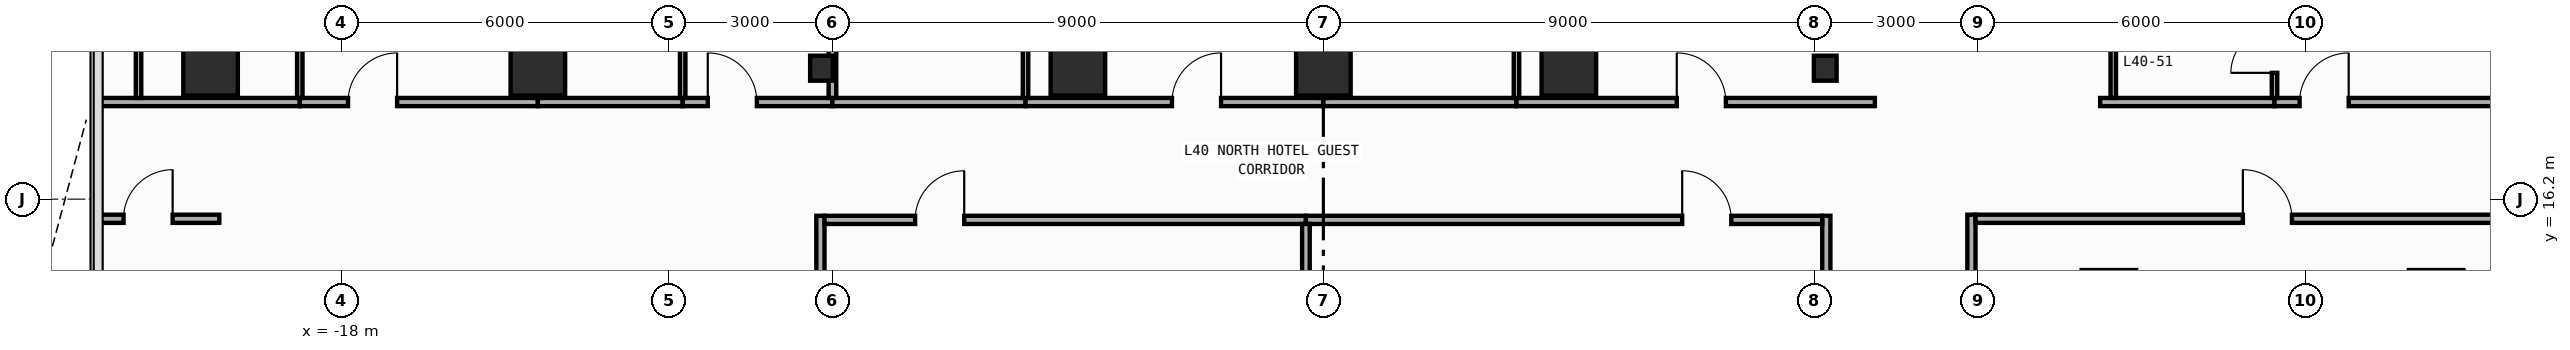
"""IFC4 building model, lengths in metres.
Left out: names, types, materials, properties, quantities, classifications, styles, units other than length and angle.
Written with IfcOpenShell. Run it as: python <this file> out.ifc"""

import sys

from ifc_helpers import new_model, si_unit, direction, frame, frame_2d, origin, origin_2d, place, context, subcontext, project, spatial, rectangle, i_section, extrude, element, fill, save


model = new_model("IFC4")
c1 = context("Model", 3, precision=1e-05, world=origin(), true_north=direction((0.0, 1.0)))
c2 = subcontext(c1, "Body", "Model", "MODEL_VIEW")
j1 = project(units=[si_unit("LENGTHUNIT", "METRE"), si_unit("PLANEANGLEUNIT", "RADIAN")], contexts=[c1])
p1 = place(None, origin())
s1 = spatial("IfcSite", under=j1, at=p1, CompositionType="ELEMENT")
p2 = place(p1, origin())
s2 = spatial("IfcBuilding", under=s1, at=p2, CompositionType="ELEMENT")
p3 = place(p2, frame((0.0, 0.0, 176.4)))
s3 = spatial("IfcBuildingStorey", under=s2, at=p3, CompositionType="ELEMENT", Elevation=176.4)
for number, where, z_axis, x_axis in (
    (1, (-9.2, 18.6, 0.0), (0.0, 0.0, 1.0), (1.0, 0.0, 0.0)),
    (2, (9.2, 18.6, 0.0), (0.0, 0.0, 1.0), (1.0, 0.0, 0.0)),
):
    element("IfcColumn", number, at=place(p3, frame(where, z_axis=z_axis, x_axis=x_axis)), inside=s3, PredefinedType="COLUMN", context=c2, shape_type="SweptSolid", body=[
        extrude(i_section(OverallWidth=0.417, OverallDepth=0.458, WebThickness=0.03, FlangeThickness=0.05, FilletRadius=0.022, at=origin_2d()), origin(), (0.0, 0.0, 1.0), 3.8),
    ])
for number, where, z_axis, x_axis in (
    (3, (-20.4, 18.6, 0.0), (0.0, 0.0, 1.0), (1.0, 0.0, 0.0)),
    (4, (-14.4, 18.6, 0.0), (0.0, 0.0, 1.0), (1.0, 0.0, 0.0)),
    (5, (-4.5, 18.6, 0.0), (0.0, 0.0, 1.0), (1.0, 0.0, 0.0)),
    (6, (0.0, 18.6, 0.0), (0.0, 0.0, 1.0), (1.0, 0.0, 0.0)),
    (7, (4.5, 18.6, 0.0), (0.0, 0.0, 1.0), (1.0, 0.0, 0.0)),
):
    element("IfcColumn", number, at=place(p3, frame(where, z_axis=z_axis, x_axis=x_axis)), inside=s3, PredefinedType="COLUMN", context=c2, shape_type="SweptSolid", body=[
        extrude(rectangle(XDim=1.0, YDim=1.0, at=origin_2d()), origin(), (0.0, 0.0, 1.0), 3.8),
    ])
p4 = place(p3, frame((-9.22, 0.5, 0.0), z_axis=(0.0, 0.0, 1.0), x_axis=(0.0, 1.0, 0.0)))
e8 = element("IfcWall", 8, at=p4, inside=s3, PredefinedType="PARTITIONING", context=c2, shape_type="SweptSolid", body=[
    extrude(rectangle(XDim=15.395, YDim=0.15, at=frame_2d((7.698, 0.0))), origin(), (0.0, 0.0, 1.0), 2.952),
])
p5 = place(p4, frame((4.512, 0.0, 0.0)))
e9 = element("IfcOpeningElement", 9, at=p5, cuts=e8, PredefinedType="OPENING", context=c2, shape_type="SweptSolid", body=[
    extrude(rectangle(XDim=0.9, YDim=2.15, at=frame_2d((0.45, 1.075))), frame((0.0, 0.085, 0.0), z_axis=(0.0, -1.0, 0.0), x_axis=(1.0, 0.0, 0.0)), (0.0, 0.0, 1.0), 0.17),
])
p6 = place(p3, frame((9.22, 0.5, 0.0), z_axis=(0.0, 0.0, 1.0), x_axis=(0.0, 1.0, 0.0)))
e10 = element("IfcWall", 10, at=p6, inside=s3, PredefinedType="PARTITIONING", context=c2, shape_type="SweptSolid", body=[
    extrude(rectangle(XDim=15.395, YDim=0.15, at=frame_2d((7.698, 0.0))), origin(), (0.0, 0.0, 1.0), 2.952),
])
p7 = place(p6, frame((4.512, 0.0, 0.0)))
e11 = element("IfcOpeningElement", 11, at=p7, cuts=e10, PredefinedType="OPENING", context=c2, shape_type="SweptSolid", body=[
    extrude(rectangle(XDim=0.9, YDim=2.15, at=frame_2d((0.45, 1.075))), frame((0.0, 0.085, 0.0), z_axis=(0.0, -1.0, 0.0), x_axis=(1.0, 0.0, 0.0)), (0.0, 0.0, 1.0), 0.17),
])
p8 = place(p3, frame((11.88, 7.16, 0.0), z_axis=(0.0, 0.0, 1.0), x_axis=(0.0, 1.0, 0.0)))
e12 = element("IfcWall", 12, at=p8, inside=s3, PredefinedType="PARTITIONING", context=c2, shape_type="SweptSolid", body=[
    extrude(rectangle(XDim=8.755, YDim=0.15, at=frame_2d((4.377, 0.0))), origin(), (0.0, 0.0, 1.0), 3.54),
])
p9 = place(p8, frame((0.46, 0.0, 0.0)))
e13 = element("IfcOpeningElement", 13, at=p9, cuts=e12, PredefinedType="OPENING", context=c2, shape_type="SweptSolid", body=[
    extrude(rectangle(XDim=0.9, YDim=2.15, at=frame_2d((0.45, 1.075))), frame((0.0, 0.085, 0.0), z_axis=(0.0, -1.0, 0.0), x_axis=(1.0, 0.0, 0.0)), (0.0, 0.0, 1.0), 0.17),
])
p10 = place(p3, frame((-9.145, 15.82, 0.0), z_axis=(0.0, 0.0, 1.0), x_axis=(1.0, 0.0, 0.0)))
e14 = element("IfcWall", 14, at=p10, inside=s3, PredefinedType="PARTITIONING", context=c2, shape_type="SweptSolid", body=[
    extrude(rectangle(XDim=8.825, YDim=0.15, at=frame_2d((4.413, 0.0))), origin(), (0.0, 0.0, 1.0), 3.54),
])
p11 = place(p10, frame((1.661, 0.0, 0.0)))
e15 = element("IfcOpeningElement", 15, at=p11, cuts=e14, PredefinedType="OPENING", context=c2, shape_type="SweptSolid", body=[
    extrude(rectangle(XDim=0.9, YDim=2.15, at=frame_2d((0.45, 1.075))), frame((0.0, 0.085, 0.0), z_axis=(0.0, -1.0, 0.0), x_axis=(1.0, 0.0, 0.0)), (0.0, 0.0, 1.0), 0.17),
])
p12 = place(p3, frame((-0.32, 15.82, 0.0), z_axis=(0.0, 0.0, 1.0), x_axis=(1.0, 0.0, 0.0)))
e16 = element("IfcWall", 16, at=p12, inside=s3, PredefinedType="PARTITIONING", context=c2, shape_type="SweptSolid", body=[
    extrude(rectangle(XDim=9.465, YDim=0.15, at=frame_2d((4.732, 0.0))), origin(), (0.0, 0.0, 1.0), 3.54),
])
p13 = place(p12, frame((6.898, 0.0, 0.0)))
e17 = element("IfcOpeningElement", 17, at=p13, cuts=e16, PredefinedType="OPENING", context=c2, shape_type="SweptSolid", body=[
    extrude(rectangle(XDim=0.9, YDim=2.15, at=frame_2d((0.45, 1.075))), frame((0.0, 0.085, 0.0), z_axis=(0.0, -1.0, 0.0), x_axis=(1.0, 0.0, 0.0)), (0.0, 0.0, 1.0), 0.17),
])
p14 = place(p3, frame((-22.455, 17.98, 0.0), z_axis=(0.0, 0.0, 1.0), x_axis=(1.0, 0.0, 0.0)))
e18 = element("IfcWall", 18, at=p14, inside=s3, PredefinedType="PARTITIONING", context=c2, shape_type="SweptSolid", body=[
    extrude(rectangle(XDim=3.691, YDim=0.15, at=frame_2d((1.846, 0.0))), origin(), (0.0, 0.0, 1.0), 3.54),
])
p15 = place(p3, frame((-18.764, 17.98, 0.0), z_axis=(0.0, 0.0, 1.0), x_axis=(1.0, 0.0, 0.0)))
e19 = element("IfcWall", 19, at=p15, inside=s3, PredefinedType="PARTITIONING", context=c2, shape_type="SweptSolid", body=[
    extrude(rectangle(XDim=4.364, YDim=0.15, at=frame_2d((2.182, 0.0))), origin(), (0.0, 0.0, 1.0), 3.54),
])
p16 = place(p15, frame((0.884, 0.0, 0.0)))
e20 = element("IfcOpeningElement", 20, at=p16, cuts=e19, PredefinedType="OPENING", context=c2, shape_type="SweptSolid", body=[
    extrude(rectangle(XDim=0.9, YDim=2.15, at=frame_2d((0.45, 1.075))), frame((0.0, 0.085, 0.0), z_axis=(0.0, -1.0, 0.0), x_axis=(1.0, 0.0, 0.0)), (0.0, 0.0, 1.0), 0.17),
])
p17 = place(p3, frame((-14.4, 17.98, 0.0), z_axis=(0.0, 0.0, 1.0), x_axis=(1.0, 0.0, 0.0)))
e21 = element("IfcWall", 21, at=p17, inside=s3, PredefinedType="PARTITIONING", context=c2, shape_type="SweptSolid", body=[
    extrude(rectangle(XDim=2.655, YDim=0.15, at=frame_2d((1.327, 0.0))), origin(), (0.0, 0.0, 1.0), 3.54),
])
p18 = place(p3, frame((-11.745, 17.98, 0.0), z_axis=(0.0, 0.0, 1.0), x_axis=(1.0, 0.0, 0.0)))
e22 = element("IfcWall", 22, at=p18, inside=s3, PredefinedType="PARTITIONING", context=c2, shape_type="SweptSolid", body=[
    extrude(rectangle(XDim=2.745, YDim=0.15, at=frame_2d((1.373, 0.0))), origin(), (0.0, 0.0, 1.0), 3.54),
])
p19 = place(p18, frame((0.46, 0.0, 0.0)))
e23 = element("IfcOpeningElement", 23, at=p19, cuts=e22, PredefinedType="OPENING", context=c2, shape_type="SweptSolid", body=[
    extrude(rectangle(XDim=0.9, YDim=2.15, at=frame_2d((0.45, 1.075))), frame((0.0, 0.085, 0.0), z_axis=(0.0, -1.0, 0.0), x_axis=(1.0, 0.0, 0.0)), (0.0, 0.0, 1.0), 0.17),
])
p20 = place(p3, frame((-9.0, 17.98, 0.0), z_axis=(0.0, 0.0, 1.0), x_axis=(1.0, 0.0, 0.0)))
e24 = element("IfcWall", 24, at=p20, inside=s3, PredefinedType="PARTITIONING", context=c2, shape_type="SweptSolid", body=[
    extrude(rectangle(XDim=3.54, YDim=0.15, at=frame_2d((1.77, 0.0))), origin(), (0.0, 0.0, 1.0), 3.54),
])
p21 = place(p3, frame((-5.46, 17.98, 0.0), z_axis=(0.0, 0.0, 1.0), x_axis=(1.0, 0.0, 0.0)))
e25 = element("IfcWall", 25, at=p21, inside=s3, PredefinedType="PARTITIONING", context=c2, shape_type="SweptSolid", body=[
    extrude(rectangle(XDim=5.46, YDim=0.15, at=frame_2d((2.73, 0.0))), origin(), (0.0, 0.0, 1.0), 3.54),
])
p22 = place(p21, frame((2.684, 0.0, 0.0)))
e26 = element("IfcOpeningElement", 26, at=p22, cuts=e25, PredefinedType="OPENING", context=c2, shape_type="SweptSolid", body=[
    extrude(rectangle(XDim=0.9, YDim=2.15, at=frame_2d((0.45, 1.075))), frame((0.0, 0.085, 0.0), z_axis=(0.0, -1.0, 0.0), x_axis=(1.0, 0.0, 0.0)), (0.0, 0.0, 1.0), 0.17),
])
p23 = place(p3, frame((0.0, 17.98, 0.0), z_axis=(0.0, 0.0, 1.0), x_axis=(1.0, 0.0, 0.0)))
e27 = element("IfcWall", 27, at=p23, inside=s3, PredefinedType="PARTITIONING", context=c2, shape_type="SweptSolid", body=[
    extrude(rectangle(XDim=3.54, YDim=0.15, at=frame_2d((1.77, 0.0))), origin(), (0.0, 0.0, 1.0), 3.54),
])
p24 = place(p3, frame((3.54, 17.98, 0.0), z_axis=(0.0, 0.0, 1.0), x_axis=(1.0, 0.0, 0.0)))
e28 = element("IfcWall", 28, at=p24, inside=s3, PredefinedType="PARTITIONING", context=c2, shape_type="SweptSolid", body=[
    extrude(rectangle(XDim=6.57, YDim=0.15, at=frame_2d((3.285, 0.0))), origin(), (0.0, 0.0, 1.0), 3.54),
])
p25 = place(p24, frame((2.938, 0.0, 0.0)))
e29 = element("IfcOpeningElement", 29, at=p25, cuts=e28, PredefinedType="OPENING", context=c2, shape_type="SweptSolid", body=[
    extrude(rectangle(XDim=0.9, YDim=2.15, at=frame_2d((0.45, 1.075))), frame((0.0, 0.085, 0.0), z_axis=(0.0, -1.0, 0.0), x_axis=(1.0, 0.0, 0.0)), (0.0, 0.0, 1.0), 0.17),
])
p26 = place(p3, frame((14.24, 17.98, 0.0), z_axis=(0.0, 0.0, 1.0), x_axis=(1.0, 0.0, 0.0)))
e30 = element("IfcWall", 30, at=p26, inside=s3, PredefinedType="PARTITIONING", context=c2, shape_type="SweptSolid", body=[
    extrude(rectangle(XDim=3.196, YDim=0.15, at=frame_2d((1.598, 0.0))), origin(), (0.0, 0.0, 1.0), 3.54),
])
p27 = place(p3, frame((17.436, 17.98, 0.0), z_axis=(0.0, 0.0, 1.0), x_axis=(1.0, 0.0, 0.0)))
e31 = element("IfcWall", 31, at=p27, inside=s3, PredefinedType="PARTITIONING", context=c2, shape_type="SweptSolid", body=[
    extrude(rectangle(XDim=5.019, YDim=0.15, at=frame_2d((2.51, 0.0))), origin(), (0.0, 0.0, 1.0), 3.54),
])
p28 = place(p27, frame((0.46, 0.0, 0.0)))
e32 = element("IfcOpeningElement", 32, at=p28, cuts=e31, PredefinedType="OPENING", context=c2, shape_type="SweptSolid", body=[
    extrude(rectangle(XDim=0.9, YDim=2.15, at=frame_2d((0.45, 1.075))), frame((0.0, 0.085, 0.0), z_axis=(0.0, -1.0, 0.0), x_axis=(1.0, 0.0, 0.0)), (0.0, 0.0, 1.0), 0.17),
])
p29 = place(p3, frame((11.955, 15.84, 0.0), z_axis=(0.0, 0.0, 1.0), x_axis=(1.0, 0.0, 0.0)))
e33 = element("IfcWall", 33, at=p29, inside=s3, PredefinedType="PARTITIONING", context=c2, shape_type="SweptSolid", body=[
    extrude(rectangle(XDim=10.5, YDim=0.15, at=frame_2d((5.25, 0.0))), origin(), (0.0, 0.0, 1.0), 3.54),
])
p30 = place(p29, frame((4.901, 0.0, 0.0)))
e34 = element("IfcOpeningElement", 34, at=p30, cuts=e33, PredefinedType="OPENING", context=c2, shape_type="SweptSolid", body=[
    extrude(rectangle(XDim=0.9, YDim=2.15, at=frame_2d((0.45, 1.075))), frame((0.0, 0.085, 0.0), z_axis=(0.0, -1.0, 0.0), x_axis=(1.0, 0.0, 0.0)), (0.0, 0.0, 1.0), 0.17),
])
p31 = place(p3, frame((-22.455, 15.84, 0.0), z_axis=(0.0, 0.0, 1.0), x_axis=(1.0, 0.0, 0.0)))
e35 = element("IfcWall", 35, at=p31, inside=s3, PredefinedType="PARTITIONING", context=c2, shape_type="SweptSolid", body=[
    extrude(rectangle(XDim=2.215, YDim=0.15, at=frame_2d((1.107, 0.0))), origin(), (0.0, 0.0, 1.0), 3.54),
])
p32 = place(p31, frame((0.46, 0.0, 0.0)))
e36 = element("IfcOpeningElement", 36, at=p32, cuts=e35, PredefinedType="OPENING", context=c2, shape_type="SweptSolid", body=[
    extrude(rectangle(XDim=0.9, YDim=2.15, at=frame_2d((0.45, 1.075))), frame((0.0, 0.085, 0.0), z_axis=(0.0, -1.0, 0.0), x_axis=(1.0, 0.0, 0.0)), (0.0, 0.0, 1.0), 0.17),
])
p33 = place(p3, frame((-0.32, 0.57, 0.0), z_axis=(0.0, 0.0, 1.0), x_axis=(0.0, 1.0, 0.0)))
e37 = element("IfcWall", 37, at=p33, inside=s3, PredefinedType="PARTITIONING", context=c2, shape_type="SweptSolid", body=[
    extrude(rectangle(XDim=15.175, YDim=0.14, at=frame_2d((7.587, 0.0))), origin(), (0.0, 0.0, 1.0), 3.54),
])
p34 = place(p3, frame((-18.764, 18.055, 0.0), z_axis=(0.0, 0.0, 1.0), x_axis=(0.0, 1.0, 0.0)))
e38 = element("IfcWall", 38, at=p34, inside=s3, PredefinedType="PARTITIONING", context=c2, shape_type="SweptSolid", body=[
    extrude(rectangle(XDim=2.965, YDim=0.1, at=frame_2d((1.482, 0.0))), origin(), (0.0, 0.0, 1.0), 3.54),
])
p35 = place(p34, frame((1.705, 0.0, 0.0)))
e39 = element("IfcOpeningElement", 39, at=p35, cuts=e38, PredefinedType="OPENING", context=c2, shape_type="SweptSolid", body=[
    extrude(rectangle(XDim=0.8, YDim=2.1, at=frame_2d((0.4, 1.05))), frame((0.0, 0.06, 0.0), z_axis=(0.0, -1.0, 0.0), x_axis=(1.0, 0.0, 0.0)), (0.0, 0.0, 1.0), 0.12),
])
p36 = place(p3, frame((-14.4, 18.055, 0.0), z_axis=(0.0, 0.0, 1.0), x_axis=(0.0, 1.0, 0.0)))
e40 = element("IfcWall", 40, at=p36, inside=s3, PredefinedType="PARTITIONING", context=c2, shape_type="SweptSolid", body=[
    extrude(rectangle(XDim=3.015, YDim=0.14, at=frame_2d((1.508, 0.0))), origin(), (0.0, 0.0, 1.0), 2.952),
])
p37 = place(p3, frame((-11.745, 18.055, 0.0), z_axis=(0.0, 0.0, 1.0), x_axis=(0.0, 1.0, 0.0)))
e41 = element("IfcWall", 41, at=p37, inside=s3, PredefinedType="PARTITIONING", context=c2, shape_type="SweptSolid", body=[
    extrude(rectangle(XDim=2.965, YDim=0.1, at=frame_2d((1.482, 0.0))), origin(), (0.0, 0.0, 1.0), 3.54),
])
p38 = place(p37, frame((1.705, 0.0, 0.0)))
e42 = element("IfcOpeningElement", 42, at=p38, cuts=e41, PredefinedType="OPENING", context=c2, shape_type="SweptSolid", body=[
    extrude(rectangle(XDim=0.8, YDim=2.1, at=frame_2d((0.4, 1.05))), frame((0.0, 0.06, 0.0), z_axis=(0.0, -1.0, 0.0), x_axis=(1.0, 0.0, 0.0)), (0.0, 0.0, 1.0), 0.12),
])
p39 = place(p3, frame((-9.0, 18.055, 0.0), z_axis=(0.0, 0.0, 1.0), x_axis=(0.0, 1.0, 0.0)))
e43 = element("IfcWall", 43, at=p39, inside=s3, PredefinedType="PARTITIONING", context=c2, shape_type="SweptSolid", body=[
    extrude(rectangle(XDim=3.015, YDim=0.14, at=frame_2d((1.508, 0.0))), origin(), (0.0, 0.0, 1.0), 2.952),
])
p40 = place(p3, frame((-5.46, 18.055, 0.0), z_axis=(0.0, 0.0, 1.0), x_axis=(0.0, 1.0, 0.0)))
e44 = element("IfcWall", 44, at=p40, inside=s3, PredefinedType="PARTITIONING", context=c2, shape_type="SweptSolid", body=[
    extrude(rectangle(XDim=2.965, YDim=0.1, at=frame_2d((1.482, 0.0))), origin(), (0.0, 0.0, 1.0), 3.54),
])
p41 = place(p40, frame((1.705, 0.0, 0.0)))
e45 = element("IfcOpeningElement", 45, at=p41, cuts=e44, PredefinedType="OPENING", context=c2, shape_type="SweptSolid", body=[
    extrude(rectangle(XDim=0.8, YDim=2.1, at=frame_2d((0.4, 1.05))), frame((0.0, 0.06, 0.0), z_axis=(0.0, -1.0, 0.0), x_axis=(1.0, 0.0, 0.0)), (0.0, 0.0, 1.0), 0.12),
])
p42 = place(p3, frame((0.0, 18.055, 0.0), z_axis=(0.0, 0.0, 1.0), x_axis=(0.0, 1.0, 0.0)))
e46 = element("IfcWall", 46, at=p42, inside=s3, PredefinedType="PARTITIONING", context=c2, shape_type="SweptSolid", body=[
    extrude(rectangle(XDim=3.015, YDim=0.14, at=frame_2d((1.508, 0.0))), origin(), (0.0, 0.0, 1.0), 3.54),
])
p43 = place(p3, frame((3.54, 18.055, 0.0), z_axis=(0.0, 0.0, 1.0), x_axis=(0.0, 1.0, 0.0)))
e47 = element("IfcWall", 47, at=p43, inside=s3, PredefinedType="PARTITIONING", context=c2, shape_type="SweptSolid", body=[
    extrude(rectangle(XDim=2.965, YDim=0.1, at=frame_2d((1.482, 0.0))), origin(), (0.0, 0.0, 1.0), 3.54),
])
p44 = place(p43, frame((1.705, 0.0, 0.0)))
e48 = element("IfcOpeningElement", 48, at=p44, cuts=e47, PredefinedType="OPENING", context=c2, shape_type="SweptSolid", body=[
    extrude(rectangle(XDim=0.8, YDim=2.1, at=frame_2d((0.4, 1.05))), frame((0.0, 0.06, 0.0), z_axis=(0.0, -1.0, 0.0), x_axis=(1.0, 0.0, 0.0)), (0.0, 0.0, 1.0), 0.12),
])
p45 = place(p3, frame((17.436, 18.055, 0.0), z_axis=(0.0, 0.0, 1.0), x_axis=(0.0, 1.0, 0.0)))
e49 = element("IfcWall", 49, at=p45, inside=s3, PredefinedType="PARTITIONING", context=c2, shape_type="SweptSolid", body=[
    extrude(rectangle(XDim=2.965, YDim=0.1, at=frame_2d((1.482, 0.0))), origin(), (0.0, 0.0, 1.0), 3.54),
])
p46 = place(p45, frame((0.46, 0.0, 0.0)))
e50 = element("IfcOpeningElement", 50, at=p46, cuts=e49, PredefinedType="OPENING", context=c2, shape_type="SweptSolid", body=[
    extrude(rectangle(XDim=0.8, YDim=2.1, at=frame_2d((0.4, 1.05))), frame((0.0, 0.06, 0.0), z_axis=(0.0, -1.0, 0.0), x_axis=(1.0, 0.0, 0.0)), (0.0, 0.0, 1.0), 0.12),
])
p47 = place(p3, frame((-21.72, 18.055, 0.0), z_axis=(0.0, 0.0, 1.0), x_axis=(0.0, 1.0, 0.0)))
e51 = element("IfcWall", 51, at=p47, inside=s3, PredefinedType="PARTITIONING", context=c2, shape_type="SweptSolid", body=[
    extrude(rectangle(XDim=2.965, YDim=0.1, at=frame_2d((1.482, 0.0))), origin(), (0.0, 0.0, 1.0), 3.54),
])
p48 = place(p3, frame((14.48, 18.055, 0.0), z_axis=(0.0, 0.0, 1.0), x_axis=(0.0, 1.0, 0.0)))
e52 = element("IfcWall", 52, at=p48, inside=s3, PredefinedType="PARTITIONING", context=c2, shape_type="SweptSolid", body=[
    extrude(rectangle(XDim=2.965, YDim=0.1, at=frame_2d((1.482, 0.0))), origin(), (0.0, 0.0, 1.0), 2.952),
])
p49 = place(p11, origin())
e53 = element("IfcDoor", 53, at=p49, inside=s3, OperationType="SINGLE_SWING_RIGHT", PredefinedType="DOOR", context=c2, shape_type="SweptSolid", body=[
    extrude(rectangle(XDim=0.9, YDim=2.15, at=frame_2d((0.45, 1.075))), frame((0.0, 0.025, 0.0), z_axis=(0.0, -1.0, 0.0), x_axis=(1.0, 0.0, 0.0)), (0.0, 0.0, 1.0), 0.05),
])
fill(e15, e53)
p50 = place(p13, origin())
e54 = element("IfcDoor", 54, at=p50, inside=s3, OperationType="SINGLE_SWING_LEFT", PredefinedType="DOOR", context=c2, shape_type="SweptSolid", body=[
    extrude(rectangle(XDim=0.9, YDim=2.15, at=frame_2d((0.45, 1.075))), frame((0.0, 0.025, 0.0), z_axis=(0.0, -1.0, 0.0), x_axis=(1.0, 0.0, 0.0)), (0.0, 0.0, 1.0), 0.05),
])
fill(e17, e54)
p51 = place(p16, origin())
e55 = element("IfcDoor", 55, at=p51, inside=s3, OperationType="SINGLE_SWING_RIGHT", PredefinedType="DOOR", context=c2, shape_type="SweptSolid", body=[
    extrude(rectangle(XDim=0.9, YDim=2.15, at=frame_2d((0.45, 1.075))), frame((0.0, 0.025, 0.0), z_axis=(0.0, -1.0, 0.0), x_axis=(1.0, 0.0, 0.0)), (0.0, 0.0, 1.0), 0.05),
])
fill(e20, e55)
p52 = place(p19, origin())
e56 = element("IfcDoor", 56, at=p52, inside=s3, OperationType="SINGLE_SWING_LEFT", PredefinedType="DOOR", context=c2, shape_type="SweptSolid", body=[
    extrude(rectangle(XDim=0.9, YDim=2.15, at=frame_2d((0.45, 1.075))), frame((0.0, 0.025, 0.0), z_axis=(0.0, -1.0, 0.0), x_axis=(1.0, 0.0, 0.0)), (0.0, 0.0, 1.0), 0.05),
])
fill(e23, e56)
p53 = place(p22, origin())
e57 = element("IfcDoor", 57, at=p53, inside=s3, OperationType="SINGLE_SWING_RIGHT", PredefinedType="DOOR", context=c2, shape_type="SweptSolid", body=[
    extrude(rectangle(XDim=0.9, YDim=2.15, at=frame_2d((0.45, 1.075))), frame((0.0, 0.025, 0.0), z_axis=(0.0, -1.0, 0.0), x_axis=(1.0, 0.0, 0.0)), (0.0, 0.0, 1.0), 0.05),
])
fill(e26, e57)
p54 = place(p25, origin())
e58 = element("IfcDoor", 58, at=p54, inside=s3, OperationType="SINGLE_SWING_LEFT", PredefinedType="DOOR", context=c2, shape_type="SweptSolid", body=[
    extrude(rectangle(XDim=0.9, YDim=2.15, at=frame_2d((0.45, 1.075))), frame((0.0, 0.025, 0.0), z_axis=(0.0, -1.0, 0.0), x_axis=(1.0, 0.0, 0.0)), (0.0, 0.0, 1.0), 0.05),
])
fill(e29, e58)
p55 = place(p28, origin())
e59 = element("IfcDoor", 59, at=p55, inside=s3, OperationType="SINGLE_SWING_RIGHT", PredefinedType="DOOR", context=c2, shape_type="SweptSolid", body=[
    extrude(rectangle(XDim=0.9, YDim=2.15, at=frame_2d((0.45, 1.075))), frame((0.0, 0.025, 0.0), z_axis=(0.0, -1.0, 0.0), x_axis=(1.0, 0.0, 0.0)), (0.0, 0.0, 1.0), 0.05),
])
fill(e32, e59)
p56 = place(p30, origin())
e60 = element("IfcDoor", 60, at=p56, inside=s3, OperationType="SINGLE_SWING_LEFT", PredefinedType="DOOR", context=c2, shape_type="SweptSolid", body=[
    extrude(rectangle(XDim=0.9, YDim=2.15, at=frame_2d((0.45, 1.075))), frame((0.0, 0.025, 0.0), z_axis=(0.0, -1.0, 0.0), x_axis=(1.0, 0.0, 0.0)), (0.0, 0.0, 1.0), 0.05),
])
fill(e34, e60)
p57 = place(p32, origin())
e61 = element("IfcDoor", 61, at=p57, inside=s3, OperationType="SINGLE_SWING_RIGHT", PredefinedType="DOOR", context=c2, shape_type="SweptSolid", body=[
    extrude(rectangle(XDim=0.9, YDim=2.15, at=frame_2d((0.45, 1.075))), frame((0.0, 0.025, 0.0), z_axis=(0.0, -1.0, 0.0), x_axis=(1.0, 0.0, 0.0)), (0.0, 0.0, 1.0), 0.05),
])
fill(e36, e61)
p58 = place(p46, origin())
e62 = element("IfcDoor", 62, at=p58, inside=s3, OperationType="SINGLE_SWING_LEFT", PredefinedType="DOOR", context=c2, shape_type="SweptSolid", body=[
    extrude(rectangle(XDim=0.8, YDim=2.1, at=frame_2d((0.4, 1.05))), frame((0.0, 0.025, 0.0), z_axis=(0.0, -1.0, 0.0), x_axis=(1.0, 0.0, 0.0)), (0.0, 0.0, 1.0), 0.05),
])
fill(e50, e62)
save(model, sys.argv[1])
